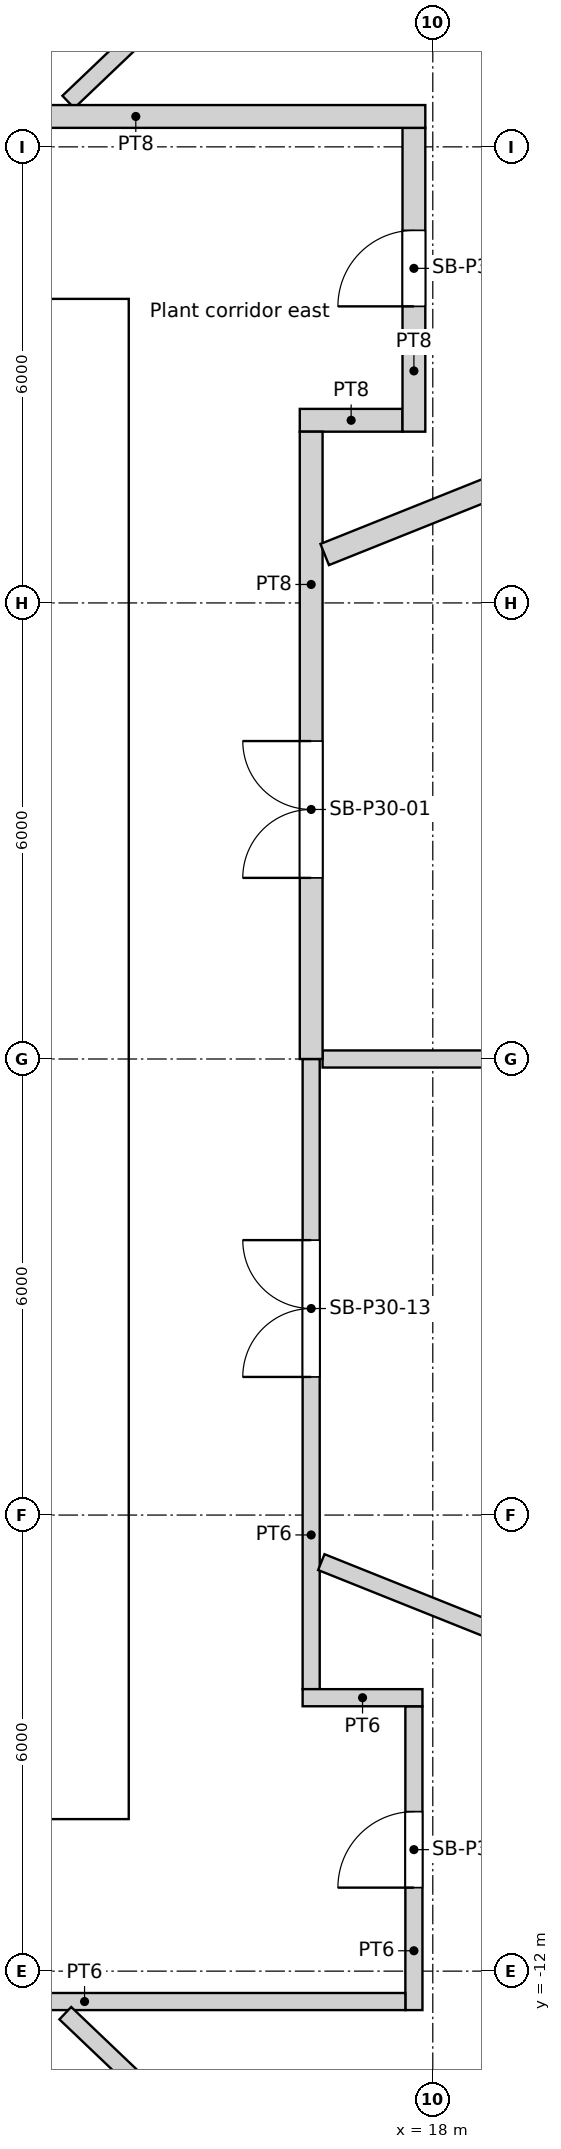
"""IFC4 building model, lengths in metres.
Left out: names, types, materials, properties, quantities, classifications, styles, units other than length and angle.
Written with IfcOpenShell. Run it as: python <this file> out.ifc"""

import sys

from ifc_helpers import new_model, si_unit, direction, frame, frame_2d, origin, origin_2d, place, context, subcontext, project, spatial, rectangle, circle, extrude, element, fill, save


model = new_model("IFC4")
c1 = context("Model", 3, precision=1e-05, world=origin(), true_north=direction((0.0, 1.0)))
c2 = subcontext(c1, "Body", "Model", "MODEL_VIEW")
j1 = project(units=[si_unit("LENGTHUNIT", "METRE"), si_unit("PLANEANGLEUNIT", "RADIAN")], contexts=[c1])
p1 = place(None, origin())
s1 = spatial("IfcSite", under=j1, at=p1, CompositionType="ELEMENT")
p2 = place(p1, origin())
s2 = spatial("IfcBuilding", under=s1, at=p2, CompositionType="ELEMENT")
p3 = place(p2, frame((0.0, 0.0, 120.0)))
s3 = spatial("IfcBuildingStorey", under=s2, at=p3, CompositionType="ELEMENT", Elevation=120.0)
for number, where, z_axis, x_axis in (
    (1, (18.822, 0.0, 0.0), (0.0, 0.0, 1.0), (1.0, 0.0, 0.0)),
    (2, (17.986, 5.548, 0.0), (0.0, 0.0, 1.0), (1.0, 0.0, 0.0)),
    (3, (15.552, 10.603, 0.0), (0.0, 0.0, 1.0), (1.0, 0.0, 0.0)),
    (4, (15.552, -10.603, 0.0), (0.0, 0.0, 1.0), (1.0, 0.0, 0.0)),
    (5, (17.986, -5.548, 0.0), (0.0, 0.0, 1.0), (1.0, 0.0, 0.0)),
):
    element("IfcColumn", number, at=place(p3, frame(where, z_axis=z_axis, x_axis=x_axis)), inside=s3, PredefinedType="COLUMN", context=c2, shape_type="SweptSolid", body=[
        extrude(circle(Radius=0.7, at=origin_2d()), origin(), (0.0, 0.0, 1.0), 6.0),
    ])
p4 = place(p3, frame((-14.0, -9.4, 0.0), z_axis=(0.0, 0.0, 1.0), x_axis=(1.0, 0.0, 0.0)))
e6 = element("IfcWall", 6, at=p4, inside=s3, PredefinedType="SOLIDWALL", context=c2, shape_type="SweptSolid", body=[
    extrude(rectangle(XDim=28.0, YDim=1.2, at=frame_2d((14.0, 0.0))), origin(), (0.0, 0.0, 1.0), 5.7),
])
p5 = place(p4, frame((14.9, 0.0, 0.0)))
e7 = element("IfcOpeningElement", 7, at=p5, cuts=e6, PredefinedType="OPENING", context=c2, shape_type="SweptSolid", body=[
    extrude(rectangle(XDim=1.0, YDim=2.1, at=frame_2d((0.5, 1.05))), frame((0.0, 0.6, 0.0), z_axis=(0.0, -1.0, 0.0), x_axis=(1.0, 0.0, 0.0)), (0.0, 0.0, 1.0), 1.2),
])
p6 = place(p4, frame((9.8, 0.0, 0.0)))
e8 = element("IfcOpeningElement", 8, at=p6, cuts=e6, PredefinedType="OPENING", context=c2, shape_type="SweptSolid", body=[
    extrude(rectangle(XDim=1.8, YDim=2.1, at=frame_2d((0.9, 1.05))), frame((0.0, 0.6, 0.0), z_axis=(0.0, -1.0, 0.0), x_axis=(1.0, 0.0, 0.0)), (0.0, 0.0, 1.0), 1.2),
])
p7 = place(p4, frame((16.4, 0.0, 0.0)))
e9 = element("IfcOpeningElement", 9, at=p7, cuts=e6, PredefinedType="OPENING", context=c2, shape_type="SweptSolid", body=[
    extrude(rectangle(XDim=1.8, YDim=2.1, at=frame_2d((0.9, 1.05))), frame((0.0, 0.6, 0.0), z_axis=(0.0, -1.0, 0.0), x_axis=(1.0, 0.0, 0.0)), (0.0, 0.0, 1.0), 1.2),
])
p8 = place(p3, frame((-14.0, 9.4, 0.0), z_axis=(0.0, 0.0, 1.0), x_axis=(1.0, 0.0, 0.0)))
e10 = element("IfcWall", 10, at=p8, inside=s3, PredefinedType="SOLIDWALL", context=c2, shape_type="SweptSolid", body=[
    extrude(rectangle(XDim=28.0, YDim=1.2, at=frame_2d((14.0, 0.0))), origin(), (0.0, 0.0, 1.0), 5.7),
])
p9 = place(p8, frame((9.8, 0.0, 0.0)))
e11 = element("IfcOpeningElement", 11, at=p9, cuts=e10, PredefinedType="OPENING", context=c2, shape_type="SweptSolid", body=[
    extrude(rectangle(XDim=1.8, YDim=2.1, at=frame_2d((0.9, 1.05))), frame((0.0, 0.6, 0.0), z_axis=(0.0, -1.0, 0.0), x_axis=(1.0, 0.0, 0.0)), (0.0, 0.0, 1.0), 1.2),
])
p10 = place(p3, frame((13.4, -8.8, 0.0), z_axis=(0.0, 0.0, 1.0), x_axis=(0.0, 1.0, 0.0)))
e12 = element("IfcWall", 12, at=p10, inside=s3, PredefinedType="SOLIDWALL", context=c2, shape_type="SweptSolid", body=[
    extrude(rectangle(XDim=17.6, YDim=1.2, at=frame_2d((8.8, 0.0))), origin(), (0.0, 0.0, 1.0), 5.7),
])
p11 = place(p10, frame((6.3, 0.0, 0.0)))
e13 = element("IfcOpeningElement", 13, at=p11, cuts=e12, PredefinedType="OPENING", context=c2, shape_type="SweptSolid", body=[
    extrude(rectangle(XDim=1.0, YDim=2.1, at=frame_2d((0.5, 1.05))), frame((0.0, 0.6, 0.0), z_axis=(0.0, -1.0, 0.0), x_axis=(1.0, 0.0, 0.0)), (0.0, 0.0, 1.0), 1.2),
])
p12 = place(p3, frame((4.411, -12.4, 0.0), z_axis=(0.0, 0.0, 1.0), x_axis=(1.0, 0.0, 0.0)))
e14 = element("IfcWall", 14, at=p12, inside=s3, PredefinedType="PARTITIONING", context=c2, shape_type="SweptSolid", body=[
    extrude(rectangle(XDim=13.229, YDim=0.225, at=frame_2d((6.614, 0.0))), origin(), (0.0, 0.0, 1.0), 5.2),
])
p13 = place(p12, frame((3.738, 0.0, 0.0)))
e15 = element("IfcOpeningElement", 15, at=p13, cuts=e14, PredefinedType="OPENING", context=c2, shape_type="SweptSolid", body=[
    extrude(rectangle(XDim=1.0, YDim=2.1, at=frame_2d((0.5, 1.05))), frame((0.0, 0.113, 0.0), z_axis=(0.0, -1.0, 0.0), x_axis=(1.0, 0.0, 0.0)), (0.0, 0.0, 1.0), 0.225),
])
p14 = place(p3, frame((12.971, 28.403, 0.0), z_axis=(0.0, 0.0, 1.0), x_axis=(-0.415415069181, -0.909631969698, 0.0)))
e16 = element("IfcWall", 16, at=p14, inside=s3, PredefinedType="PARTITIONING", context=c2, shape_type="SweptSolid", body=[
    extrude(rectangle(XDim=17.393, YDim=0.3, at=frame_2d((8.697, 0.0))), origin(), (0.0, 0.0, 1.0), 5.2),
])
p15 = place(p3, frame((16.4, -8.29, 0.0), z_axis=(0.0, 0.0, 1.0), x_axis=(0.0, 1.0, 0.0)))
e17 = element("IfcWall", 17, at=p15, inside=s3, PredefinedType="PARTITIONING", context=c2, shape_type="SweptSolid", body=[
    extrude(rectangle(XDim=8.29, YDim=0.225, at=frame_2d((4.145, 0.0))), origin(), (0.0, 0.0, 1.0), 5.2),
])
p16 = place(p15, frame((4.108, 0.0, 0.0)))
e18 = element("IfcOpeningElement", 18, at=p16, cuts=e17, PredefinedType="OPENING", context=c2, shape_type="SweptSolid", body=[
    extrude(rectangle(XDim=1.8, YDim=2.4, at=frame_2d((0.9, 1.2))), frame((0.0, 0.113, 0.0), z_axis=(0.0, -1.0, 0.0), x_axis=(1.0, 0.0, 0.0)), (0.0, 0.0, 1.0), 0.225),
])
p17 = place(p3, frame((16.4, 0.0, 0.0), z_axis=(0.0, 0.0, 1.0), x_axis=(0.0, 1.0, 0.0)))
e19 = element("IfcWall", 19, at=p17, inside=s3, PredefinedType="PARTITIONING", context=c2, shape_type="SweptSolid", body=[
    extrude(rectangle(XDim=8.253, YDim=0.3, at=frame_2d((4.126, 0.0))), origin(), (0.0, 0.0, 1.0), 5.2),
])
p18 = place(p17, frame((2.383, 0.0, 0.0)))
e20 = element("IfcOpeningElement", 20, at=p18, cuts=e19, PredefinedType="OPENING", context=c2, shape_type="SweptSolid", body=[
    extrude(rectangle(XDim=1.8, YDim=2.4, at=frame_2d((0.9, 1.2))), frame((0.0, 0.15, 0.0), z_axis=(0.0, -1.0, 0.0), x_axis=(1.0, 0.0, 0.0)), (0.0, 0.0, 1.0), 0.3),
])
p19 = place(p3, frame((16.25, 8.403, 0.0), z_axis=(0.0, 0.0, 1.0), x_axis=(1.0, 0.0, 0.0)))
e21 = element("IfcWall", 21, at=p19, inside=s3, PredefinedType="PARTITIONING", context=c2, shape_type="SweptSolid", body=[
    extrude(rectangle(XDim=1.352, YDim=0.3, at=frame_2d((0.676, 0.0))), origin(), (0.0, 0.0, 1.0), 5.2),
])
p20 = place(p3, frame((17.752, -12.512, 0.0), z_axis=(0.0, 0.0, 1.0), x_axis=(0.0, 1.0, 0.0)))
e22 = element("IfcWall", 22, at=p20, inside=s3, PredefinedType="PARTITIONING", context=c2, shape_type="SweptSolid", body=[
    extrude(rectangle(XDim=3.997, YDim=0.225, at=frame_2d((1.999, 0.0))), origin(), (0.0, 0.0, 1.0), 5.2),
])
p21 = place(p20, frame((1.611, 0.0, 0.0)))
e23 = element("IfcOpeningElement", 23, at=p21, cuts=e22, PredefinedType="OPENING", context=c2, shape_type="SweptSolid", body=[
    extrude(rectangle(XDim=1.0, YDim=2.1, at=frame_2d((0.5, 1.05))), frame((0.0, 0.113, 0.0), z_axis=(0.0, -1.0, 0.0), x_axis=(1.0, 0.0, 0.0)), (0.0, 0.0, 1.0), 0.225),
])
p22 = place(p3, frame((17.864, -8.403, 0.0), z_axis=(0.0, 0.0, 1.0), x_axis=(-1.0, 0.0, 0.0)))
e24 = element("IfcWall", 24, at=p22, inside=s3, PredefinedType="PARTITIONING", context=c2, shape_type="SweptSolid", body=[
    extrude(rectangle(XDim=1.576, YDim=0.225, at=frame_2d((0.788, 0.0))), origin(), (0.0, 0.0, 1.0), 5.2),
])
p23 = place(p3, frame((17.752, 8.253, 0.0), z_axis=(0.0, 0.0, 1.0), x_axis=(0.0, 1.0, 0.0)))
e25 = element("IfcWall", 25, at=p23, inside=s3, PredefinedType="PARTITIONING", context=c2, shape_type="SweptSolid", body=[
    extrude(rectangle(XDim=3.997, YDim=0.3, at=frame_2d((1.999, 0.0))), origin(), (0.0, 0.0, 1.0), 5.2),
])
p24 = place(p23, frame((1.649, 0.0, 0.0)))
e26 = element("IfcOpeningElement", 26, at=p24, cuts=e25, PredefinedType="OPENING", context=c2, shape_type="SweptSolid", body=[
    extrude(rectangle(XDim=1.0, YDim=2.1, at=frame_2d((0.5, 1.05))), frame((0.0, 0.15, 0.0), z_axis=(0.0, -1.0, 0.0), x_axis=(1.0, 0.0, 0.0)), (0.0, 0.0, 1.0), 0.3),
])
p25 = place(p3, frame((17.902, 12.4, 0.0), z_axis=(0.0, 0.0, 1.0), x_axis=(-1.0, 0.0, 0.0)))
e27 = element("IfcWall", 27, at=p25, inside=s3, PredefinedType="PARTITIONING", context=c2, shape_type="SweptSolid", body=[
    extrude(rectangle(XDim=17.311, YDim=0.3, at=frame_2d((8.655, 0.0))), origin(), (0.0, 0.0, 1.0), 5.2),
])
p26 = place(p25, frame((7.668, 0.0, 0.0)))
e28 = element("IfcOpeningElement", 28, at=p26, cuts=e27, PredefinedType="OPENING", context=c2, shape_type="SweptSolid", body=[
    extrude(rectangle(XDim=1.8, YDim=2.4, at=frame_2d((0.9, 1.2))), frame((0.0, 0.15, 0.0), z_axis=(0.0, -1.0, 0.0), x_axis=(1.0, 0.0, 0.0)), (0.0, 0.0, 1.0), 0.3),
])
p27 = place(p25, frame((13.875, 0.0, 0.0)))
e29 = element("IfcOpeningElement", 29, at=p27, cuts=e27, PredefinedType="OPENING", context=c2, shape_type="SweptSolid", body=[
    extrude(rectangle(XDim=1.8, YDim=2.4, at=frame_2d((0.9, 1.2))), frame((0.0, 0.15, 0.0), z_axis=(0.0, -1.0, 0.0), x_axis=(1.0, 0.0, 0.0)), (0.0, 0.0, 1.0), 0.3),
])
p28 = place(p3, frame((22.598, -21.547, 0.0), z_axis=(0.0, 0.0, 1.0), x_axis=(-0.72374624757, 0.690066206337, 0.0)))
e30 = element("IfcWall", 30, at=p28, inside=s3, PredefinedType="PARTITIONING", context=c2, shape_type="SweptSolid", body=[
    extrude(rectangle(XDim=13.033, YDim=0.225, at=frame_2d((6.517, 0.0))), origin(), (0.0, 0.0, 1.0), 2.7),
])
p29 = place(p3, frame((22.598, 21.547, 0.0), z_axis=(0.0, 0.0, 1.0), x_axis=(-0.723750872009, -0.690061356161, 0.0)))
e31 = element("IfcWall", 31, at=p29, inside=s3, PredefinedType="PARTITIONING", context=c2, shape_type="SweptSolid", body=[
    extrude(rectangle(XDim=12.979, YDim=0.225, at=frame_2d((6.49, 0.0))), origin(), (0.0, 0.0, 1.0), 2.7),
])
p30 = place(p3, frame((28.988, -11.605, 0.0), z_axis=(0.0, 0.0, 1.0), x_axis=(-0.928362433176, 0.371676193303, 0.0)))
e32 = element("IfcWall", 32, at=p30, inside=s3, PredefinedType="PARTITIONING", context=c2, shape_type="SweptSolid", body=[
    extrude(rectangle(XDim=13.415, YDim=0.225, at=frame_2d((6.708, 0.0))), origin(), (0.0, 0.0, 1.0), 5.2),
])
p31 = place(p3, frame((28.988, 11.605, 0.0), z_axis=(0.0, 0.0, 1.0), x_axis=(-0.928363284364, -0.37167406722, 0.0)))
e33 = element("IfcWall", 33, at=p31, inside=s3, PredefinedType="PARTITIONING", context=c2, shape_type="SweptSolid", body=[
    extrude(rectangle(XDim=13.367, YDim=0.3, at=frame_2d((6.684, 0.0))), origin(), (0.0, 0.0, 1.0), 5.2),
])
p32 = place(p3, frame((31.224, 0.0, 0.0), z_axis=(0.0, 0.0, 1.0), x_axis=(-1.0, 0.0, 0.0)))
e34 = element("IfcWall", 34, at=p32, inside=s3, PredefinedType="PARTITIONING", context=c2, shape_type="SweptSolid", body=[
    extrude(rectangle(XDim=14.674, YDim=0.225, at=frame_2d((7.337, 0.0))), origin(), (0.0, 0.0, 1.0), 2.7),
])
p33 = place(p11, origin())
e35 = element("IfcDoor", 35, at=p33, inside=s3, OperationType="DOUBLE_DOOR_SINGLE_SWING", PredefinedType="DOOR", context=c2, shape_type="SweptSolid", body=[
    extrude(rectangle(XDim=1.0, YDim=2.1, at=frame_2d((0.5, 1.05))), frame((0.0, 0.025, 0.0), z_axis=(0.0, -1.0, 0.0), x_axis=(1.0, 0.0, 0.0)), (0.0, 0.0, 1.0), 0.05),
])
fill(e13, e35)
p34 = place(p18, origin())
e36 = element("IfcDoor", 36, at=p34, inside=s3, OperationType="DOUBLE_DOOR_SINGLE_SWING", PredefinedType="DOOR", context=c2, shape_type="SweptSolid", body=[
    extrude(rectangle(XDim=1.8, YDim=2.4, at=frame_2d((0.9, 1.2))), frame((0.0, 0.025, 0.0), z_axis=(0.0, -1.0, 0.0), x_axis=(1.0, 0.0, 0.0)), (0.0, 0.0, 1.0), 0.05),
])
fill(e20, e36)
p35 = place(p24, origin())
e37 = element("IfcDoor", 37, at=p35, inside=s3, OperationType="SINGLE_SWING_LEFT", PredefinedType="DOOR", context=c2, shape_type="SweptSolid", body=[
    extrude(rectangle(XDim=1.0, YDim=2.1, at=frame_2d((0.5, 1.05))), frame((0.0, 0.025, 0.0), z_axis=(0.0, -1.0, 0.0), x_axis=(1.0, 0.0, 0.0)), (0.0, 0.0, 1.0), 0.05),
])
fill(e26, e37)
p36 = place(p21, origin())
e38 = element("IfcDoor", 38, at=p36, inside=s3, OperationType="SINGLE_SWING_LEFT", PredefinedType="DOOR", context=c2, shape_type="SweptSolid", body=[
    extrude(rectangle(XDim=1.0, YDim=2.1, at=frame_2d((0.5, 1.05))), frame((0.0, 0.025, 0.0), z_axis=(0.0, -1.0, 0.0), x_axis=(1.0, 0.0, 0.0)), (0.0, 0.0, 1.0), 0.05),
])
fill(e23, e38)
p37 = place(p16, origin())
e39 = element("IfcDoor", 39, at=p37, inside=s3, OperationType="DOUBLE_DOOR_SINGLE_SWING", PredefinedType="DOOR", context=c2, shape_type="SweptSolid", body=[
    extrude(rectangle(XDim=1.8, YDim=2.4, at=frame_2d((0.9, 1.2))), frame((0.0, 0.025, 0.0), z_axis=(0.0, -1.0, 0.0), x_axis=(1.0, 0.0, 0.0)), (0.0, 0.0, 1.0), 0.05),
])
fill(e18, e39)
save(model, sys.argv[1])
